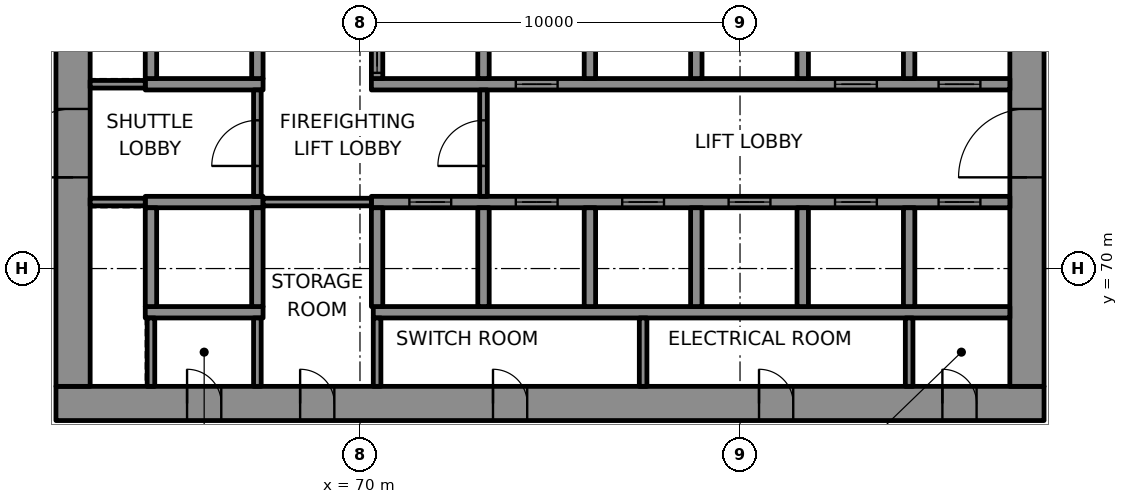
"""IFC4 building model, lengths in metres.
Left out: names, types, materials, properties, quantities, classifications, styles, units other than length and angle.
Written with IfcOpenShell. Run it as: python <this file> out.ifc"""

import sys

from ifc_helpers import new_model, si_unit, direction, frame, frame_2d, origin, place, context, subcontext, project, spatial, rectangle, extrude, element, fill, save


model = new_model("IFC4")
c1 = context("Model", 3, precision=1e-05, world=origin(), true_north=direction((0.0, 1.0)))
c2 = subcontext(c1, "Body", "Model", "MODEL_VIEW")
j1 = project(units=[si_unit("LENGTHUNIT", "METRE"), si_unit("PLANEANGLEUNIT", "RADIAN")], contexts=[c1])
p1 = place(None, origin())
s1 = spatial("IfcSite", under=j1, at=p1, CompositionType="ELEMENT")
p2 = place(p1, origin())
s2 = spatial("IfcBuilding", under=s1, at=p2, CompositionType="ELEMENT")
p3 = place(p2, frame((0.0, 0.0, 132.4)))
s3 = spatial("IfcBuildingStorey", under=s2, at=p3, CompositionType="ELEMENT", Elevation=132.4)
p4 = place(p3, frame((62.0, 66.45, 0.0), z_axis=(0.0, 0.0, 1.0), x_axis=(1.0, 0.0, 0.0)))
e1 = element("IfcWall", 1, at=p4, inside=s3, PredefinedType="SHEAR", context=c2, shape_type="SweptSolid", body=[
    extrude(rectangle(XDim=26.0, YDim=0.9, at=frame_2d((13.0, 0.0))), origin(), (0.0, 0.0, 1.0), 4.0),
])
p5 = place(p4, frame((3.45, 0.0, 0.0)))
e2 = element("IfcOpeningElement", 2, at=p5, cuts=e1, PredefinedType="OPENING", context=c2, shape_type="SweptSolid", body=[
    extrude(rectangle(XDim=0.9, YDim=2.1, at=frame_2d((0.45, 1.05))), frame((0.0, 0.46, 0.0), z_axis=(0.0, -1.0, 0.0), x_axis=(1.0, 0.0, 0.0)), (0.0, 0.0, 1.0), 0.92),
])
p6 = place(p4, frame((6.425, 0.0, 0.0)))
e3 = element("IfcOpeningElement", 3, at=p6, cuts=e1, PredefinedType="OPENING", context=c2, shape_type="SweptSolid", body=[
    extrude(rectangle(XDim=0.9, YDim=2.1, at=frame_2d((0.45, 1.05))), frame((0.0, 0.46, 0.0), z_axis=(0.0, -1.0, 0.0), x_axis=(1.0, 0.0, 0.0)), (0.0, 0.0, 1.0), 0.92),
])
p7 = place(p4, frame((11.5, 0.0, 0.0)))
e4 = element("IfcOpeningElement", 4, at=p7, cuts=e1, PredefinedType="OPENING", context=c2, shape_type="SweptSolid", body=[
    extrude(rectangle(XDim=0.9, YDim=2.1, at=frame_2d((0.45, 1.05))), frame((0.0, 0.46, 0.0), z_axis=(0.0, -1.0, 0.0), x_axis=(1.0, 0.0, 0.0)), (0.0, 0.0, 1.0), 0.92),
])
p8 = place(p4, frame((18.5, 0.0, 0.0)))
e5 = element("IfcOpeningElement", 5, at=p8, cuts=e1, PredefinedType="OPENING", context=c2, shape_type="SweptSolid", body=[
    extrude(rectangle(XDim=0.9, YDim=2.1, at=frame_2d((0.45, 1.05))), frame((0.0, 0.46, 0.0), z_axis=(0.0, -1.0, 0.0), x_axis=(1.0, 0.0, 0.0)), (0.0, 0.0, 1.0), 0.92),
])
p9 = place(p4, frame((23.325, 0.0, 0.0)))
e6 = element("IfcOpeningElement", 6, at=p9, cuts=e1, PredefinedType="OPENING", context=c2, shape_type="SweptSolid", body=[
    extrude(rectangle(XDim=0.9, YDim=2.1, at=frame_2d((0.45, 1.05))), frame((0.0, 0.46, 0.0), z_axis=(0.0, -1.0, 0.0), x_axis=(1.0, 0.0, 0.0)), (0.0, 0.0, 1.0), 0.92),
])
p10 = place(p3, frame((62.45, 66.9, 0.0), z_axis=(0.0, 0.0, 1.0), x_axis=(0.0, 1.0, 0.0)))
e7 = element("IfcWall", 7, at=p10, inside=s3, PredefinedType="SHEAR", context=c2, shape_type="SweptSolid", body=[
    extrude(rectangle(XDim=16.2, YDim=0.9, at=frame_2d((8.1, 0.0))), origin(), (0.0, 0.0, 1.0), 4.0),
])
p11 = place(p10, frame((5.5, 0.0, 0.0)))
e8 = element("IfcOpeningElement", 8, at=p11, cuts=e7, PredefinedType="OPENING", context=c2, shape_type="SweptSolid", body=[
    extrude(rectangle(XDim=1.8, YDim=2.1, at=frame_2d((0.9, 1.05))), frame((0.0, 0.46, 0.0), z_axis=(0.0, -1.0, 0.0), x_axis=(1.0, 0.0, 0.0)), (0.0, 0.0, 1.0), 0.92),
])
p12 = place(p3, frame((87.55, 66.9, 0.0), z_axis=(0.0, 0.0, 1.0), x_axis=(0.0, 1.0, 0.0)))
e9 = element("IfcWall", 9, at=p12, inside=s3, PredefinedType="SHEAR", context=c2, shape_type="SweptSolid", body=[
    extrude(rectangle(XDim=16.2, YDim=0.9, at=frame_2d((8.1, 0.0))), origin(), (0.0, 0.0, 1.0), 4.0),
])
p13 = place(p12, frame((5.5, 0.0, 0.0)))
e10 = element("IfcOpeningElement", 10, at=p13, cuts=e9, PredefinedType="OPENING", context=c2, shape_type="SweptSolid", body=[
    extrude(rectangle(XDim=1.8, YDim=2.1, at=frame_2d((0.9, 1.05))), frame((0.0, 0.46, 0.0), z_axis=(0.0, -1.0, 0.0), x_axis=(1.0, 0.0, 0.0)), (0.0, 0.0, 1.0), 0.92),
])
p14 = place(p12, frame((12.272, 0.0, 0.0)))
e11 = element("IfcOpeningElement", 11, at=p14, cuts=e9, PredefinedType="OPENING", context=c2, shape_type="SweptSolid", body=[
    extrude(rectangle(XDim=0.9, YDim=2.1, at=frame_2d((0.45, 1.05))), frame((0.0, 0.46, 0.0), z_axis=(0.0, -1.0, 0.0), x_axis=(1.0, 0.0, 0.0)), (0.0, 0.0, 1.0), 0.92),
])
p15 = place(p3, frame((64.35, 68.85, 0.0), z_axis=(0.0, 0.0, 1.0), x_axis=(1.0, 0.0, 0.0)))
e12 = element("IfcWall", 12, at=p15, inside=s3, PredefinedType="SHEAR", context=c2, shape_type="SweptSolid", body=[
    extrude(rectangle(XDim=3.1, YDim=0.3, at=frame_2d((1.55, 0.0))), origin(), (0.0, 0.0, 1.0), 4.0),
])
p16 = place(p3, frame((70.35, 68.85, 0.0), z_axis=(0.0, 0.0, 1.0), x_axis=(1.0, 0.0, 0.0)))
e13 = element("IfcWall", 13, at=p16, inside=s3, PredefinedType="SHEAR", context=c2, shape_type="SweptSolid", body=[
    extrude(rectangle(XDim=16.75, YDim=0.3, at=frame_2d((8.375, 0.0))), origin(), (0.0, 0.0, 1.0), 4.0),
])
p17 = place(p3, frame((64.35, 71.75, 0.0), z_axis=(0.0, 0.0, 1.0), x_axis=(1.0, 0.0, 0.0)))
e14 = element("IfcWall", 14, at=p17, inside=s3, PredefinedType="SHEAR", context=c2, shape_type="SweptSolid", body=[
    extrude(rectangle(XDim=3.1, YDim=0.3, at=frame_2d((1.55, 0.0))), origin(), (0.0, 0.0, 1.0), 4.0),
])
p18 = place(p3, frame((70.3, 71.75, 0.0), z_axis=(0.0, 0.0, 1.0), x_axis=(1.0, 0.0, 0.0)))
e15 = element("IfcWall", 15, at=p18, inside=s3, PredefinedType="SHEAR", context=c2, shape_type="SweptSolid", body=[
    extrude(rectangle(XDim=16.8, YDim=0.3, at=frame_2d((8.4, 0.0))), origin(), (0.0, 0.0, 1.0), 4.0),
])
p19 = place(p18, frame((1.0, 0.0, 0.0)))
e16 = element("IfcOpeningElement", 16, at=p19, cuts=e15, PredefinedType="OPENING", context=c2, shape_type="SweptSolid", body=[
    extrude(rectangle(XDim=1.1, YDim=2.1, at=frame_2d((0.55, 1.05))), frame((0.0, 0.16, 0.0), z_axis=(0.0, -1.0, 0.0), x_axis=(1.0, 0.0, 0.0)), (0.0, 0.0, 1.0), 0.32),
])
p20 = place(p18, frame((3.8, 0.0, 0.0)))
e17 = element("IfcOpeningElement", 17, at=p20, cuts=e15, PredefinedType="OPENING", context=c2, shape_type="SweptSolid", body=[
    extrude(rectangle(XDim=1.1, YDim=2.1, at=frame_2d((0.55, 1.05))), frame((0.0, 0.16, 0.0), z_axis=(0.0, -1.0, 0.0), x_axis=(1.0, 0.0, 0.0)), (0.0, 0.0, 1.0), 0.32),
])
p21 = place(p18, frame((6.6, 0.0, 0.0)))
e18 = element("IfcOpeningElement", 18, at=p21, cuts=e15, PredefinedType="OPENING", context=c2, shape_type="SweptSolid", body=[
    extrude(rectangle(XDim=1.1, YDim=2.1, at=frame_2d((0.55, 1.05))), frame((0.0, 0.16, 0.0), z_axis=(0.0, -1.0, 0.0), x_axis=(1.0, 0.0, 0.0)), (0.0, 0.0, 1.0), 0.32),
])
p22 = place(p18, frame((9.4, 0.0, 0.0)))
e19 = element("IfcOpeningElement", 19, at=p22, cuts=e15, PredefinedType="OPENING", context=c2, shape_type="SweptSolid", body=[
    extrude(rectangle(XDim=1.1, YDim=2.1, at=frame_2d((0.55, 1.05))), frame((0.0, 0.16, 0.0), z_axis=(0.0, -1.0, 0.0), x_axis=(1.0, 0.0, 0.0)), (0.0, 0.0, 1.0), 0.32),
])
p23 = place(p18, frame((12.2, 0.0, 0.0)))
e20 = element("IfcOpeningElement", 20, at=p23, cuts=e15, PredefinedType="OPENING", context=c2, shape_type="SweptSolid", body=[
    extrude(rectangle(XDim=1.1, YDim=2.1, at=frame_2d((0.55, 1.05))), frame((0.0, 0.16, 0.0), z_axis=(0.0, -1.0, 0.0), x_axis=(1.0, 0.0, 0.0)), (0.0, 0.0, 1.0), 0.32),
])
p24 = place(p18, frame((14.925, 0.0, 0.0)))
e21 = element("IfcOpeningElement", 21, at=p24, cuts=e15, PredefinedType="OPENING", context=c2, shape_type="SweptSolid", body=[
    extrude(rectangle(XDim=1.1, YDim=2.1, at=frame_2d((0.55, 1.05))), frame((0.0, 0.16, 0.0), z_axis=(0.0, -1.0, 0.0), x_axis=(1.0, 0.0, 0.0)), (0.0, 0.0, 1.0), 0.32),
])
p25 = place(p3, frame((64.35, 74.85, 0.0), z_axis=(0.0, 0.0, 1.0), x_axis=(1.0, 0.0, 0.0)))
e22 = element("IfcWall", 22, at=p25, inside=s3, PredefinedType="SHEAR", context=c2, shape_type="SweptSolid", body=[
    extrude(rectangle(XDim=3.1, YDim=0.3, at=frame_2d((1.55, 0.0))), origin(), (0.0, 0.0, 1.0), 4.0),
])
p26 = place(p3, frame((70.3, 74.85, 0.0), z_axis=(0.0, 0.0, 1.0), x_axis=(1.0, 0.0, 0.0)))
e23 = element("IfcWall", 23, at=p26, inside=s3, PredefinedType="SHEAR", context=c2, shape_type="SweptSolid", body=[
    extrude(rectangle(XDim=16.8, YDim=0.3, at=frame_2d((8.4, 0.0))), origin(), (0.0, 0.0, 1.0), 4.0),
])
p27 = place(p26, frame((3.8, 0.0, 0.0)))
e24 = element("IfcOpeningElement", 24, at=p27, cuts=e23, PredefinedType="OPENING", context=c2, shape_type="SweptSolid", body=[
    extrude(rectangle(XDim=1.1, YDim=2.1, at=frame_2d((0.55, 1.05))), frame((0.0, 0.16, 0.0), z_axis=(0.0, -1.0, 0.0), x_axis=(1.0, 0.0, 0.0)), (0.0, 0.0, 1.0), 0.32),
])
p28 = place(p26, frame((12.2, 0.0, 0.0)))
e25 = element("IfcOpeningElement", 25, at=p28, cuts=e23, PredefinedType="OPENING", context=c2, shape_type="SweptSolid", body=[
    extrude(rectangle(XDim=1.1, YDim=2.1, at=frame_2d((0.55, 1.05))), frame((0.0, 0.16, 0.0), z_axis=(0.0, -1.0, 0.0), x_axis=(1.0, 0.0, 0.0)), (0.0, 0.0, 1.0), 0.32),
])
p29 = place(p26, frame((14.925, 0.0, 0.0)))
e26 = element("IfcOpeningElement", 26, at=p29, cuts=e23, PredefinedType="OPENING", context=c2, shape_type="SweptSolid", body=[
    extrude(rectangle(XDim=1.1, YDim=2.1, at=frame_2d((0.55, 1.05))), frame((0.0, 0.16, 0.0), z_axis=(0.0, -1.0, 0.0), x_axis=(1.0, 0.0, 0.0)), (0.0, 0.0, 1.0), 0.32),
])
for number, where, z_axis, x_axis in (
    (27, (64.5, 69.0, 0.0), (0.0, 0.0, 1.0), (0.0, 1.0, 0.0)),
    (28, (64.5, 75.0, 0.0), (0.0, 0.0, 1.0), (0.0, 1.0, 0.0)),
    (29, (67.3, 69.0, 0.0), (0.0, 0.0, 1.0), (0.0, 1.0, 0.0)),
    (30, (67.3, 75.0, 0.0), (0.0, 0.0, 1.0), (0.0, 1.0, 0.0)),
    (31, (70.45, 69.0, 0.0), (0.0, 0.0, 1.0), (0.0, 1.0, 0.0)),
):
    element("IfcWall", number, at=place(p3, frame(where, z_axis=z_axis, x_axis=x_axis)), inside=s3, PredefinedType="SHEAR", context=c2, shape_type="SweptSolid", body=[
        extrude(rectangle(XDim=2.6, YDim=0.3, at=frame_2d((1.3, 0.0))), origin(), (0.0, 0.0, 1.0), 4.0),
    ])
p30 = place(p3, frame((70.45, 75.0, 0.0), z_axis=(0.0, 0.0, 1.0), x_axis=(0.0, 1.0, 0.0)))
e32 = element("IfcWall", 32, at=p30, inside=s3, PredefinedType="SHEAR", context=c2, shape_type="SweptSolid", body=[
    extrude(rectangle(XDim=2.6, YDim=0.3, at=frame_2d((1.3, 0.0))), origin(), (0.0, 0.0, 1.0), 4.0),
])
p31 = place(p30, frame((0.15, 0.0, 0.0)))
e33 = element("IfcOpeningElement", 33, at=p31, cuts=e32, PredefinedType="OPENING", context=c2, shape_type="SweptSolid", body=[
    extrude(rectangle(XDim=1.1, YDim=2.1, at=frame_2d((0.55, 1.05))), frame((0.0, 0.16, 0.0), z_axis=(0.0, -1.0, 0.0), x_axis=(1.0, 0.0, 0.0)), (0.0, 0.0, 1.0), 0.32),
])
for number, where, z_axis, x_axis in (
    (34, (73.25, 69.0, 0.0), (0.0, 0.0, 1.0), (0.0, 1.0, 0.0)),
    (35, (73.25, 75.0, 0.0), (0.0, 0.0, 1.0), (0.0, 1.0, 0.0)),
    (36, (76.05, 69.0, 0.0), (0.0, 0.0, 1.0), (0.0, 1.0, 0.0)),
    (37, (76.05, 75.0, 0.0), (0.0, 0.0, 1.0), (0.0, 1.0, 0.0)),
    (38, (78.85, 69.0, 0.0), (0.0, 0.0, 1.0), (0.0, 1.0, 0.0)),
    (39, (78.85, 75.0, 0.0), (0.0, 0.0, 1.0), (0.0, 1.0, 0.0)),
    (40, (81.65, 69.0, 0.0), (0.0, 0.0, 1.0), (0.0, 1.0, 0.0)),
    (41, (81.65, 75.0, 0.0), (0.0, 0.0, 1.0), (0.0, 1.0, 0.0)),
    (42, (84.45, 69.0, 0.0), (0.0, 0.0, 1.0), (0.0, 1.0, 0.0)),
    (43, (84.45, 75.0, 0.0), (0.0, 0.0, 1.0), (0.0, 1.0, 0.0)),
):
    element("IfcWall", number, at=place(p3, frame(where, z_axis=z_axis, x_axis=x_axis)), inside=s3, PredefinedType="SHEAR", context=c2, shape_type="SweptSolid", body=[
        extrude(rectangle(XDim=2.6, YDim=0.3, at=frame_2d((1.3, 0.0))), origin(), (0.0, 0.0, 1.0), 4.0),
    ])
p32 = place(p3, frame((62.9, 71.75, 0.0), z_axis=(0.0, 0.0, 1.0), x_axis=(1.0, 0.0, 0.0)))
e44 = element("IfcWall", 44, at=p32, inside=s3, PredefinedType="PARTITIONING", context=c2, shape_type="SweptSolid", body=[
    extrude(rectangle(XDim=1.45, YDim=0.2, at=frame_2d((0.725, 0.0))), origin(), (0.0, 0.0, 1.0), 4.0),
])
p33 = place(p3, frame((67.45, 71.75, 0.0), z_axis=(0.0, 0.0, 1.0), x_axis=(1.0, 0.0, 0.0)))
e45 = element("IfcWall", 45, at=p33, inside=s3, PredefinedType="PARTITIONING", context=c2, shape_type="SweptSolid", body=[
    extrude(rectangle(XDim=2.85, YDim=0.2, at=frame_2d((1.425, 0.0))), origin(), (0.0, 0.0, 1.0), 4.0),
])
p34 = place(p3, frame((62.9, 74.85, 0.0), z_axis=(0.0, 0.0, 1.0), x_axis=(1.0, 0.0, 0.0)))
e46 = element("IfcWall", 46, at=p34, inside=s3, PredefinedType="PARTITIONING", context=c2, shape_type="SweptSolid", body=[
    extrude(rectangle(XDim=1.45, YDim=0.2, at=frame_2d((0.725, 0.0))), origin(), (0.0, 0.0, 1.0), 4.0),
])
for number, where, z_axis, x_axis in (
    (47, (64.5, 66.9, 0.0), (0.0, 0.0, 1.0), (0.0, 1.0, 0.0)),
    (48, (67.3, 66.9, 0.0), (0.0, 0.0, 1.0), (0.0, 1.0, 0.0)),
):
    element("IfcWall", number, at=place(p3, frame(where, z_axis=z_axis, x_axis=x_axis)), inside=s3, PredefinedType="PARTITIONING", context=c2, shape_type="SweptSolid", body=[
        extrude(rectangle(XDim=1.8, YDim=0.2, at=frame_2d((0.9, 0.0))), origin(), (0.0, 0.0, 1.0), 4.0),
    ])
p35 = place(p3, frame((67.3, 71.9, 0.0), z_axis=(0.0, 0.0, 1.0), x_axis=(0.0, 1.0, 0.0)))
e49 = element("IfcWall", 49, at=p35, inside=s3, PredefinedType="PARTITIONING", context=c2, shape_type="SweptSolid", body=[
    extrude(rectangle(XDim=2.8, YDim=0.2, at=frame_2d((1.4, 0.0))), origin(), (0.0, 0.0, 1.0), 4.0),
])
p36 = place(p35, frame((0.8, 0.0, 0.0)))
e50 = element("IfcOpeningElement", 50, at=p36, cuts=e49, PredefinedType="OPENING", context=c2, shape_type="SweptSolid", body=[
    extrude(rectangle(XDim=1.2, YDim=2.1, at=frame_2d((0.6, 1.05))), frame((0.0, 0.11, 0.0), z_axis=(0.0, -1.0, 0.0), x_axis=(1.0, 0.0, 0.0)), (0.0, 0.0, 1.0), 0.22),
])
p37 = place(p3, frame((70.45, 66.9, 0.0), z_axis=(0.0, 0.0, 1.0), x_axis=(0.0, 1.0, 0.0)))
e51 = element("IfcWall", 51, at=p37, inside=s3, PredefinedType="PARTITIONING", context=c2, shape_type="SweptSolid", body=[
    extrude(rectangle(XDim=1.8, YDim=0.2, at=frame_2d((0.9, 0.0))), origin(), (0.0, 0.0, 1.0), 4.0),
])
p38 = place(p3, frame((73.25, 71.9, 0.0), z_axis=(0.0, 0.0, 1.0), x_axis=(0.0, 1.0, 0.0)))
e52 = element("IfcWall", 52, at=p38, inside=s3, PredefinedType="PARTITIONING", context=c2, shape_type="SweptSolid", body=[
    extrude(rectangle(XDim=2.8, YDim=0.2, at=frame_2d((1.4, 0.0))), origin(), (0.0, 0.0, 1.0), 4.0),
])
p39 = place(p38, frame((0.8, 0.0, 0.0)))
e53 = element("IfcOpeningElement", 53, at=p39, cuts=e52, PredefinedType="OPENING", context=c2, shape_type="SweptSolid", body=[
    extrude(rectangle(XDim=1.2, YDim=2.1, at=frame_2d((0.6, 1.05))), frame((0.0, 0.11, 0.0), z_axis=(0.0, -1.0, 0.0), x_axis=(1.0, 0.0, 0.0)), (0.0, 0.0, 1.0), 0.22),
])
for number, where, z_axis, x_axis in (
    (54, (77.45, 66.9, 0.0), (0.0, 0.0, 1.0), (0.0, 1.0, 0.0)),
    (55, (84.45, 66.9, 0.0), (0.0, 0.0, 1.0), (0.0, 1.0, 0.0)),
):
    element("IfcWall", number, at=place(p3, frame(where, z_axis=z_axis, x_axis=x_axis)), inside=s3, PredefinedType="PARTITIONING", context=c2, shape_type="SweptSolid", body=[
        extrude(rectangle(XDim=1.8, YDim=0.2, at=frame_2d((0.9, 0.0))), origin(), (0.0, 0.0, 1.0), 4.0),
    ])
p40 = place(p19, origin())
e56 = element("IfcDoor", 56, at=p40, inside=s3, OperationType="DOUBLE_DOOR_SLIDING", PredefinedType="DOOR", context=c2, shape_type="SweptSolid", body=[
    extrude(rectangle(XDim=1.1, YDim=2.1, at=frame_2d((0.55, 1.05))), frame((0.0, 0.025, 0.0), z_axis=(0.0, -1.0, 0.0), x_axis=(1.0, 0.0, 0.0)), (0.0, 0.0, 1.0), 0.05),
])
fill(e16, e56)
p41 = place(p20, origin())
e57 = element("IfcDoor", 57, at=p41, inside=s3, OperationType="DOUBLE_DOOR_SLIDING", PredefinedType="DOOR", context=c2, shape_type="SweptSolid", body=[
    extrude(rectangle(XDim=1.1, YDim=2.1, at=frame_2d((0.55, 1.05))), frame((0.0, 0.025, 0.0), z_axis=(0.0, -1.0, 0.0), x_axis=(1.0, 0.0, 0.0)), (0.0, 0.0, 1.0), 0.05),
])
fill(e17, e57)
p42 = place(p21, origin())
e58 = element("IfcDoor", 58, at=p42, inside=s3, OperationType="DOUBLE_DOOR_SLIDING", PredefinedType="DOOR", context=c2, shape_type="SweptSolid", body=[
    extrude(rectangle(XDim=1.1, YDim=2.1, at=frame_2d((0.55, 1.05))), frame((0.0, 0.025, 0.0), z_axis=(0.0, -1.0, 0.0), x_axis=(1.0, 0.0, 0.0)), (0.0, 0.0, 1.0), 0.05),
])
fill(e18, e58)
p43 = place(p22, origin())
e59 = element("IfcDoor", 59, at=p43, inside=s3, OperationType="DOUBLE_DOOR_SLIDING", PredefinedType="DOOR", context=c2, shape_type="SweptSolid", body=[
    extrude(rectangle(XDim=1.1, YDim=2.1, at=frame_2d((0.55, 1.05))), frame((0.0, 0.025, 0.0), z_axis=(0.0, -1.0, 0.0), x_axis=(1.0, 0.0, 0.0)), (0.0, 0.0, 1.0), 0.05),
])
fill(e19, e59)
p44 = place(p23, origin())
e60 = element("IfcDoor", 60, at=p44, inside=s3, OperationType="DOUBLE_DOOR_SLIDING", PredefinedType="DOOR", context=c2, shape_type="SweptSolid", body=[
    extrude(rectangle(XDim=1.1, YDim=2.1, at=frame_2d((0.55, 1.05))), frame((0.0, 0.025, 0.0), z_axis=(0.0, -1.0, 0.0), x_axis=(1.0, 0.0, 0.0)), (0.0, 0.0, 1.0), 0.05),
])
fill(e20, e60)
p45 = place(p24, origin())
e61 = element("IfcDoor", 61, at=p45, inside=s3, OperationType="DOUBLE_DOOR_SLIDING", PredefinedType="DOOR", context=c2, shape_type="SweptSolid", body=[
    extrude(rectangle(XDim=1.1, YDim=2.1, at=frame_2d((0.55, 1.05))), frame((0.0, 0.025, 0.0), z_axis=(0.0, -1.0, 0.0), x_axis=(1.0, 0.0, 0.0)), (0.0, 0.0, 1.0), 0.05),
])
fill(e21, e61)
p46 = place(p31, origin())
e62 = element("IfcDoor", 62, at=p46, inside=s3, OperationType="DOUBLE_DOOR_SLIDING", PredefinedType="DOOR", context=c2, shape_type="SweptSolid", body=[
    extrude(rectangle(XDim=1.1, YDim=2.1, at=frame_2d((0.55, 1.05))), frame((0.0, 0.025, 0.0), z_axis=(0.0, -1.0, 0.0), x_axis=(1.0, 0.0, 0.0)), (0.0, 0.0, 1.0), 0.05),
])
fill(e33, e62)
p47 = place(p27, origin())
e63 = element("IfcDoor", 63, at=p47, inside=s3, OperationType="DOUBLE_DOOR_SLIDING", PredefinedType="DOOR", context=c2, shape_type="SweptSolid", body=[
    extrude(rectangle(XDim=1.1, YDim=2.1, at=frame_2d((0.55, 1.05))), frame((0.0, 0.025, 0.0), z_axis=(0.0, -1.0, 0.0), x_axis=(1.0, 0.0, 0.0)), (0.0, 0.0, 1.0), 0.05),
])
fill(e24, e63)
p48 = place(p28, origin())
e64 = element("IfcDoor", 64, at=p48, inside=s3, OperationType="DOUBLE_DOOR_SLIDING", PredefinedType="DOOR", context=c2, shape_type="SweptSolid", body=[
    extrude(rectangle(XDim=1.1, YDim=2.1, at=frame_2d((0.55, 1.05))), frame((0.0, 0.025, 0.0), z_axis=(0.0, -1.0, 0.0), x_axis=(1.0, 0.0, 0.0)), (0.0, 0.0, 1.0), 0.05),
])
fill(e25, e64)
p49 = place(p29, origin())
e65 = element("IfcDoor", 65, at=p49, inside=s3, OperationType="DOUBLE_DOOR_SLIDING", PredefinedType="DOOR", context=c2, shape_type="SweptSolid", body=[
    extrude(rectangle(XDim=1.1, YDim=2.1, at=frame_2d((0.55, 1.05))), frame((0.0, 0.025, 0.0), z_axis=(0.0, -1.0, 0.0), x_axis=(1.0, 0.0, 0.0)), (0.0, 0.0, 1.0), 0.05),
])
fill(e26, e65)
p50 = place(p39, origin())
e66 = element("IfcDoor", 66, at=p50, inside=s3, OperationType="SINGLE_SWING_LEFT", PredefinedType="DOOR", context=c2, shape_type="SweptSolid", body=[
    extrude(rectangle(XDim=1.2, YDim=2.1, at=frame_2d((0.6, 1.05))), frame((0.0, 0.025, 0.0), z_axis=(0.0, -1.0, 0.0), x_axis=(1.0, 0.0, 0.0)), (0.0, 0.0, 1.0), 0.05),
])
fill(e53, e66)
p51 = place(p36, origin())
e67 = element("IfcDoor", 67, at=p51, inside=s3, OperationType="SINGLE_SWING_RIGHT", PredefinedType="DOOR", context=c2, shape_type="SweptSolid", body=[
    extrude(rectangle(XDim=1.2, YDim=2.1, at=frame_2d((0.6, 1.05))), frame((0.0, 0.025, 0.0), z_axis=(0.0, -1.0, 0.0), x_axis=(1.0, 0.0, 0.0)), (0.0, 0.0, 1.0), 0.05),
])
fill(e50, e67)
p52 = place(p11, origin())
e68 = element("IfcDoor", 68, at=p52, inside=s3, OperationType="SINGLE_SWING_LEFT", PredefinedType="DOOR", context=c2, shape_type="SweptSolid", body=[
    extrude(rectangle(XDim=1.8, YDim=2.1, at=frame_2d((0.9, 1.05))), frame((0.0, 0.17, 0.0), z_axis=(0.0, -1.0, 0.0), x_axis=(1.0, 0.0, 0.0)), (0.0, 0.0, 1.0), 0.34),
])
fill(e8, e68)
p53 = place(p13, origin())
e69 = element("IfcDoor", 69, at=p53, inside=s3, OperationType="SINGLE_SWING_RIGHT", PredefinedType="DOOR", context=c2, shape_type="SweptSolid", body=[
    extrude(rectangle(XDim=1.8, YDim=2.1, at=frame_2d((0.9, 1.05))), frame((0.0, 0.17, 0.0), z_axis=(0.0, -1.0, 0.0), x_axis=(1.0, 0.0, 0.0)), (0.0, 0.0, 1.0), 0.34),
])
fill(e10, e69)
p54 = place(p5, origin())
e70 = element("IfcDoor", 70, at=p54, inside=s3, OperationType="SINGLE_SWING_LEFT", PredefinedType="DOOR", context=c2, shape_type="SweptSolid", body=[
    extrude(rectangle(XDim=0.9, YDim=2.1, at=frame_2d((0.45, 1.05))), frame((0.0, 0.17, 0.0), z_axis=(0.0, -1.0, 0.0), x_axis=(1.0, 0.0, 0.0)), (0.0, 0.0, 1.0), 0.34),
])
fill(e2, e70)
p55 = place(p6, origin())
e71 = element("IfcDoor", 71, at=p55, inside=s3, OperationType="SINGLE_SWING_RIGHT", PredefinedType="DOOR", context=c2, shape_type="SweptSolid", body=[
    extrude(rectangle(XDim=0.9, YDim=2.1, at=frame_2d((0.45, 1.05))), frame((0.0, 0.17, 0.0), z_axis=(0.0, -1.0, 0.0), x_axis=(1.0, 0.0, 0.0)), (0.0, 0.0, 1.0), 0.34),
])
fill(e3, e71)
p56 = place(p7, origin())
e72 = element("IfcDoor", 72, at=p56, inside=s3, OperationType="SINGLE_SWING_LEFT", PredefinedType="DOOR", context=c2, shape_type="SweptSolid", body=[
    extrude(rectangle(XDim=0.9, YDim=2.1, at=frame_2d((0.45, 1.05))), frame((0.0, 0.17, 0.0), z_axis=(0.0, -1.0, 0.0), x_axis=(1.0, 0.0, 0.0)), (0.0, 0.0, 1.0), 0.34),
])
fill(e4, e72)
p57 = place(p8, origin())
e73 = element("IfcDoor", 73, at=p57, inside=s3, OperationType="SINGLE_SWING_RIGHT", PredefinedType="DOOR", context=c2, shape_type="SweptSolid", body=[
    extrude(rectangle(XDim=0.9, YDim=2.1, at=frame_2d((0.45, 1.05))), frame((0.0, 0.17, 0.0), z_axis=(0.0, -1.0, 0.0), x_axis=(1.0, 0.0, 0.0)), (0.0, 0.0, 1.0), 0.34),
])
fill(e5, e73)
p58 = place(p9, origin())
e74 = element("IfcDoor", 74, at=p58, inside=s3, OperationType="SINGLE_SWING_LEFT", PredefinedType="DOOR", context=c2, shape_type="SweptSolid", body=[
    extrude(rectangle(XDim=0.9, YDim=2.1, at=frame_2d((0.45, 1.05))), frame((0.0, 0.17, 0.0), z_axis=(0.0, -1.0, 0.0), x_axis=(1.0, 0.0, 0.0)), (0.0, 0.0, 1.0), 0.34),
])
fill(e6, e74)
save(model, sys.argv[1])
